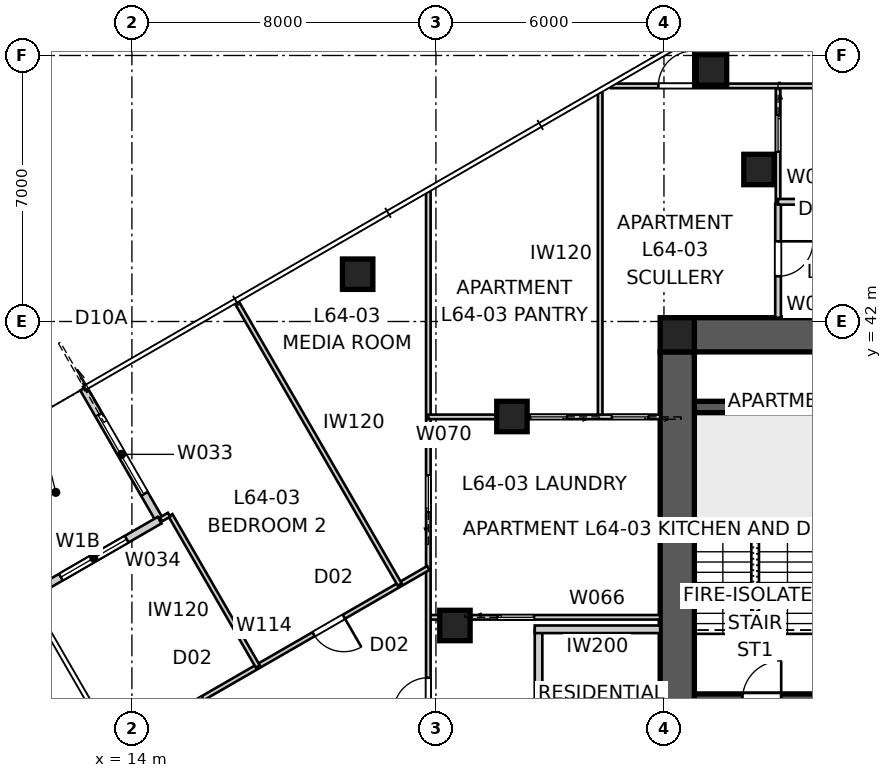
"""IFC4 building model, lengths in metres.
Left out: names, types, materials, properties, quantities, classifications, styles, units other than length and angle.
Written with IfcOpenShell. Run it as: python <this file> out.ifc"""

import sys

from ifc_helpers import new_model, si_unit, direction, frame, frame_2d, origin, origin_2d, place, context, subcontext, project, spatial, polyline, rectangle, outline, extrude, element, fill, save


model = new_model("IFC4")
c1 = context("Model", 3, precision=1e-05, world=origin(), true_north=direction((0.0, 1.0)))
c2 = subcontext(c1, "Body", "Model", "MODEL_VIEW")
j1 = project(units=[si_unit("LENGTHUNIT", "METRE"), si_unit("PLANEANGLEUNIT", "RADIAN")], contexts=[c1])
p1 = place(None, origin())
s1 = spatial("IfcSite", under=j1, at=p1, CompositionType="ELEMENT")
p2 = place(p1, origin())
s2 = spatial("IfcBuilding", under=s1, at=p2, CompositionType="ELEMENT")
p3 = place(p2, frame((0.0, 0.0, 232.0)))
s3 = spatial("IfcBuildingStorey", under=s2, at=p3, CompositionType="ELEMENT", Elevation=232.0)
p4 = place(p3, frame((28.8, 41.65, 0.0), z_axis=(0.0, 0.0, 1.0), x_axis=(1.0, 0.0, 0.0)))
e1 = element("IfcWall", 1, at=p4, inside=s3, PredefinedType="SHEAR", context=c2, shape_type="SweptSolid", body=[
    extrude(outline(polyline([(0.0, -0.45), (22.4, -0.45), (22.4, -0.025), (22.85, -0.025), (22.85, 0.025), (22.4, 0.025), (22.4, 0.45), (0.0, 0.45), (0.0, 0.025), (-0.45, 0.025), (-0.45, -0.025), (0.0, -0.025), (0.0, -0.45)])), origin(), (0.0, 0.0, 1.0), 3.4),
])
p5 = place(p3, frame((28.35, 41.2, 0.0), z_axis=(0.0, 0.0, 1.0), x_axis=(0.0, -1.0, 0.0)))
e2 = element("IfcWall", 2, at=p5, inside=s3, PredefinedType="SHEAR", context=c2, shape_type="SweptSolid", body=[
    extrude(outline(polyline([(0.0, -0.45), (22.4, -0.45), (22.4, -0.025), (22.85, -0.025), (22.85, 0.025), (22.4, 0.025), (22.4, 0.45), (0.0, 0.45), (0.0, 0.025), (-0.45, 0.025), (-0.45, -0.025), (0.0, -0.025), (0.0, -0.45)])), origin(), (0.0, 0.0, 1.0), 3.4),
])
p6 = place(p5, frame((11.14, 0.0, 0.0)))
e3 = element("IfcOpeningElement", 3, at=p6, cuts=e2, PredefinedType="OPENING", context=c2, shape_type="SweptSolid", body=[
    extrude(rectangle(XDim=1.02, YDim=2.4, at=frame_2d((0.51, 1.2))), frame((0.0, 0.46, 0.0), z_axis=(0.0, -1.0, 0.0), x_axis=(1.0, 0.0, 0.0)), (0.0, 0.0, 1.0), 0.92),
])
p7 = place(p3, frame((28.8, 32.05, 0.0), z_axis=(0.0, 0.0, 1.0), x_axis=(1.0, 0.0, 0.0)))
e4 = element("IfcWall", 4, at=p7, inside=s3, PredefinedType="SHEAR", context=c2, shape_type="SweptSolid", body=[
    extrude(rectangle(XDim=22.4, YDim=0.3, at=frame_2d((11.2, 0.0))), origin(), (0.0, 0.0, 1.0), 3.4),
])
p8 = place(p7, frame((19.04, 0.0, 0.0)))
e5 = element("IfcOpeningElement", 5, at=p8, cuts=e4, PredefinedType="OPENING", context=c2, shape_type="SweptSolid", body=[
    extrude(rectangle(XDim=0.92, YDim=2.1, at=frame_2d((0.46, 1.05))), frame((0.0, 0.16, 0.0), z_axis=(0.0, -1.0, 0.0), x_axis=(1.0, 0.0, 0.0)), (0.0, 0.0, 1.0), 0.32),
])
p9 = place(p7, frame((1.265, 0.0, 0.0)))
e6 = element("IfcOpeningElement", 6, at=p9, cuts=e4, PredefinedType="OPENING", context=c2, shape_type="SweptSolid", body=[
    extrude(rectangle(XDim=1.02, YDim=2.1, at=frame_2d((0.51, 1.05))), frame((0.0, 0.16, 0.0), z_axis=(0.0, -1.0, 0.0), x_axis=(1.0, 0.0, 0.0)), (0.0, 0.0, 1.0), 0.32),
])
p10 = place(p7, frame((4.015, 0.0, 0.0)))
e7 = element("IfcOpeningElement", 7, at=p10, cuts=e4, PredefinedType="OPENING", context=c2, shape_type="SweptSolid", body=[
    extrude(rectangle(XDim=0.92, YDim=2.1, at=frame_2d((0.46, 1.05))), frame((0.0, 0.16, 0.0), z_axis=(0.0, -1.0, 0.0), x_axis=(1.0, 0.0, 0.0)), (0.0, 0.0, 1.0), 0.32),
])
p11 = place(p7, frame((6.115, 0.0, 0.0)))
e8 = element("IfcOpeningElement", 8, at=p11, cuts=e4, PredefinedType="OPENING", context=c2, shape_type="SweptSolid", body=[
    extrude(rectangle(XDim=0.92, YDim=2.1, at=frame_2d((0.46, 1.05))), frame((0.0, 0.16, 0.0), z_axis=(0.0, -1.0, 0.0), x_axis=(1.0, 0.0, 0.0)), (0.0, 0.0, 1.0), 0.32),
])
p12 = place(p7, frame((9.79, 0.0, 0.0)))
e9 = element("IfcOpeningElement", 9, at=p12, cuts=e4, PredefinedType="OPENING", context=c2, shape_type="SweptSolid", body=[
    extrude(rectangle(XDim=0.92, YDim=2.1, at=frame_2d((0.46, 1.05))), frame((0.0, 0.16, 0.0), z_axis=(0.0, -1.0, 0.0), x_axis=(1.0, 0.0, 0.0)), (0.0, 0.0, 1.0), 0.32),
])
p13 = place(p7, frame((12.05, 0.0, 0.0)))
e10 = element("IfcOpeningElement", 10, at=p13, cuts=e4, PredefinedType="OPENING", context=c2, shape_type="SweptSolid", body=[
    extrude(rectangle(XDim=1.1, YDim=2.1, at=frame_2d((0.55, 1.05))), frame((0.0, 0.16, 0.0), z_axis=(0.0, -1.0, 0.0), x_axis=(1.0, 0.0, 0.0)), (0.0, 0.0, 1.0), 0.32),
])
p14 = place(p7, frame((14.85, 0.0, 0.0)))
e11 = element("IfcOpeningElement", 11, at=p14, cuts=e4, PredefinedType="OPENING", context=c2, shape_type="SweptSolid", body=[
    extrude(rectangle(XDim=1.1, YDim=2.1, at=frame_2d((0.55, 1.05))), frame((0.0, 0.16, 0.0), z_axis=(0.0, -1.0, 0.0), x_axis=(1.0, 0.0, 0.0)), (0.0, 0.0, 1.0), 0.32),
])
p15 = place(p3, frame((28.8, 39.75, 0.0), z_axis=(0.0, 0.0, 1.0), x_axis=(1.0, 0.0, 0.0)))
e12 = element("IfcWall", 12, at=p15, inside=s3, PredefinedType="SHEAR", context=c2, shape_type="SweptSolid", body=[
    extrude(rectangle(XDim=3.5, YDim=0.3, at=frame_2d((1.75, 0.0))), origin(), (0.0, 0.0, 1.0), 3.4),
])
p16 = place(p3, frame((28.35, 41.65, 0.0), z_axis=(0.0, 0.0, 1.0), x_axis=(1.0, 0.0, 0.0)))
e13 = element("IfcColumn", 13, at=p16, inside=s3, PredefinedType="COLUMN", context=c2, shape_type="SweptSolid", body=[
    extrude(rectangle(XDim=0.9, YDim=0.9, at=origin_2d()), origin(), (0.0, 0.0, 1.0), 3.4),
])
for number, where, z_axis, x_axis in (
    (14, (29.25, 48.62, 0.0), (0.0, 0.0, 1.0), (1.0, 0.0, 0.0)),
    (15, (19.94, 43.245, 0.0), (0.0, 0.0, 1.0), (1.0, 0.0, 0.0)),
):
    element("IfcColumn", number, at=place(p3, frame(where, z_axis=z_axis, x_axis=x_axis)), inside=s3, PredefinedType="COLUMN", context=c2, shape_type="SweptSolid", body=[
        extrude(rectangle(XDim=0.8, YDim=0.8, at=origin_2d()), origin(), (0.0, 0.0, 1.0), 3.2),
    ])
for number, where, z_axis, x_axis in (
    (16, (30.5, 46.0, 0.0), (0.0, 0.0, 1.0), (1.0, 0.0, 0.0)),
    (17, (24.0, 39.5, 0.0), (0.0, 0.0, 1.0), (1.0, 0.0, 0.0)),
    (18, (22.5, 34.0, 0.0), (0.0, 0.0, 1.0), (1.0, 0.0, 0.0)),
):
    element("IfcColumn", number, at=place(p3, frame(where, z_axis=z_axis, x_axis=x_axis)), inside=s3, PredefinedType="COLUMN", context=c2, shape_type="SweptSolid", body=[
        extrude(rectangle(XDim=0.8, YDim=0.8, at=origin_2d()), origin(), (0.0, 0.0, 1.0), 3.4),
    ])
p17 = place(p3, frame((12.729, 40.236, 0.0), z_axis=(0.0, 0.0, 1.0), x_axis=(0.49999894854, -0.866026010844, 0.0)))
e19 = element("IfcWall", 19, at=p17, inside=s3, PredefinedType="SOLIDWALL", context=c2, shape_type="SweptSolid", body=[
    extrude(rectangle(XDim=4.0, YDim=0.2, at=frame_2d((2.0, 0.0))), origin(), (0.0, 0.0, 1.0), 3.2),
])
p18 = place(p17, frame((0.8, 0.0, 0.0)))
e20 = element("IfcOpeningElement", 20, at=p18, cuts=e19, PredefinedType="OPENING", context=c2, shape_type="SweptSolid", body=[
    extrude(rectangle(XDim=2.4, YDim=2.1, at=frame_2d((1.2, 1.05))), frame((0.0, 0.11, 0.0), z_axis=(0.0, -1.0, 0.0), x_axis=(1.0, 0.0, 0.0)), (0.0, 0.0, 1.0), 0.22),
])
p19 = place(p3, frame((14.729, 36.771, 0.0), z_axis=(0.0, 0.0, 1.0), x_axis=(-0.866026010844, -0.49999894854, 0.0)))
e21 = element("IfcWall", 21, at=p19, inside=s3, PredefinedType="SOLIDWALL", context=c2, shape_type="SweptSolid", body=[
    extrude(rectangle(XDim=4.0, YDim=0.2, at=frame_2d((2.0, 0.0))), origin(), (0.0, 0.0, 1.0), 3.2),
])
p20 = place(p19, frame((1.0, 0.0, 0.4)))
e22 = element("IfcOpeningElement", 22, at=p20, cuts=e21, PredefinedType="OPENING", context=c2, shape_type="SweptSolid", body=[
    extrude(rectangle(XDim=2.0, YDim=1.8, at=frame_2d((1.0, 0.9))), frame((0.0, 0.11, 0.0), z_axis=(0.0, -1.0, 0.0), x_axis=(1.0, 0.0, 0.0)), (0.0, 0.0, 1.0), 0.22),
])
p21 = place(p3, frame((24.7, 26.1, 0.0), z_axis=(0.0, 0.0, 1.0), x_axis=(0.0, 1.0, 0.0)))
e23 = element("IfcWall", 23, at=p21, inside=s3, PredefinedType="PARTITIONING", context=c2, shape_type="SweptSolid", body=[
    extrude(rectangle(XDim=7.8, YDim=0.2, at=frame_2d((3.9, 0.0))), origin(), (0.0, 0.0, 1.0), 3.2),
])
p22 = place(p21, frame((3.39, 0.0, 0.0)))
e24 = element("IfcOpeningElement", 24, at=p22, cuts=e23, PredefinedType="OPENING", context=c2, shape_type="SweptSolid", body=[
    extrude(rectangle(XDim=1.02, YDim=2.34, at=frame_2d((0.51, 1.17))), frame((0.0, 0.11, 0.0), z_axis=(0.0, -1.0, 0.0), x_axis=(1.0, 0.0, 0.0)), (0.0, 0.0, 1.0), 0.22),
])
p23 = place(p3, frame((27.9, 33.9, 0.0), z_axis=(0.0, 0.0, 1.0), x_axis=(-1.0, 0.0, 0.0)))
e25 = element("IfcWall", 25, at=p23, inside=s3, PredefinedType="PARTITIONING", context=c2, shape_type="SweptSolid", body=[
    extrude(rectangle(XDim=3.3, YDim=0.2, at=frame_2d((1.65, 0.0))), origin(), (0.0, 0.0, 1.0), 3.2),
])
p24 = place(p3, frame((21.8, 34.216, 0.0), z_axis=(0.0, 0.0, 1.0), x_axis=(1.0, 0.0, 0.0)))
e26 = element("IfcWall", 26, at=p24, inside=s3, PredefinedType="PARTITIONING", context=c2, shape_type="SweptSolid", body=[
    extrude(rectangle(XDim=6.1, YDim=0.12, at=frame_2d((3.05, 0.0))), origin(), (0.0, 0.0, 1.0), 3.2),
])
p25 = place(p24, frame((1.82, 0.0, 0.0)))
e27 = element("IfcOpeningElement", 27, at=p25, cuts=e26, PredefinedType="OPENING", context=c2, shape_type="SweptSolid", body=[
    extrude(rectangle(XDim=0.96, YDim=2.1, at=frame_2d((0.48, 1.05))), frame((0.0, 0.07, 0.0), z_axis=(0.0, -1.0, 0.0), x_axis=(1.0, 0.0, 0.0)), (0.0, 0.0, 1.0), 0.14),
])
p26 = place(p3, frame((21.8, 16.603, 0.0), z_axis=(0.0, 0.0, 1.0), x_axis=(0.0, 1.0, 0.0)))
e28 = element("IfcWall", 28, at=p26, inside=s3, PredefinedType="PARTITIONING", context=c2, shape_type="SweptSolid", body=[
    extrude(rectangle(XDim=28.823, YDim=0.12, at=frame_2d((14.412, 0.0))), origin(), (0.0, 0.0, 1.0), 3.2),
])
p27 = place(p26, frame((11.052, 0.0, 0.0)))
e29 = element("IfcOpeningElement", 29, at=p27, cuts=e28, PredefinedType="OPENING", context=c2, shape_type="SweptSolid", body=[
    extrude(rectangle(XDim=0.92, YDim=2.34, at=frame_2d((0.46, 1.17))), frame((0.0, 0.07, 0.0), z_axis=(0.0, -1.0, 0.0), x_axis=(1.0, 0.0, 0.0)), (0.0, 0.0, 1.0), 0.14),
])
p28 = place(p26, frame((15.102, 0.0, 0.0)))
e30 = element("IfcOpeningElement", 30, at=p28, cuts=e28, PredefinedType="OPENING", context=c2, shape_type="SweptSolid", body=[
    extrude(rectangle(XDim=0.92, YDim=2.34, at=frame_2d((0.46, 1.17))), frame((0.0, 0.07, 0.0), z_axis=(0.0, -1.0, 0.0), x_axis=(1.0, 0.0, 0.0)), (0.0, 0.0, 1.0), 0.14),
])
p29 = place(p26, frame((20.389, 0.0, 0.0)))
e31 = element("IfcOpeningElement", 31, at=p29, cuts=e28, PredefinedType="OPENING", context=c2, shape_type="SweptSolid", body=[
    extrude(rectangle(XDim=0.96, YDim=2.1, at=frame_2d((0.48, 1.05))), frame((0.0, 0.07, 0.0), z_axis=(0.0, -1.0, 0.0), x_axis=(1.0, 0.0, 0.0)), (0.0, 0.0, 1.0), 0.14),
])
p30 = place(p26, frame((0.326, 0.0, 0.0)))
e32 = element("IfcOpeningElement", 32, at=p30, cuts=e28, PredefinedType="OPENING", context=c2, shape_type="SweptSolid", body=[
    extrude(rectangle(XDim=0.96, YDim=2.1, at=frame_2d((0.48, 1.05))), frame((0.0, 0.07, 0.0), z_axis=(0.0, -1.0, 0.0), x_axis=(1.0, 0.0, 0.0)), (0.0, 0.0, 1.0), 0.14),
])
p31 = place(p3, frame((26.322, 39.49, 0.0), z_axis=(0.0, 0.0, 1.0), x_axis=(0.0, 1.0, 0.0)))
e33 = element("IfcWall", 33, at=p31, inside=s3, PredefinedType="PARTITIONING", context=c2, shape_type="SweptSolid", body=[
    extrude(rectangle(XDim=8.548, YDim=0.12, at=frame_2d((4.274, 0.0))), origin(), (0.0, 0.0, 1.0), 3.2),
])
p32 = place(p3, frame((27.9, 39.49, 0.0), z_axis=(0.0, 0.0, 1.0), x_axis=(-1.0, 0.0, 0.0)))
e34 = element("IfcWall", 34, at=p32, inside=s3, PredefinedType="PARTITIONING", context=c2, shape_type="SweptSolid", body=[
    extrude(rectangle(XDim=6.1, YDim=0.12, at=frame_2d((3.05, 0.0))), origin(), (0.0, 0.0, 1.0), 3.2),
])
p33 = place(p32, frame((2.459, 0.0, 0.0)))
e35 = element("IfcOpeningElement", 35, at=p33, cuts=e34, PredefinedType="OPENING", context=c2, shape_type="SweptSolid", body=[
    extrude(rectangle(XDim=0.96, YDim=2.1, at=frame_2d((0.48, 1.05))), frame((0.0, 0.07, 0.0), z_axis=(0.0, -1.0, 0.0), x_axis=(1.0, 0.0, 0.0)), (0.0, 0.0, 1.0), 0.14),
])
p34 = place(p32, frame((0.309, 0.0, 0.0)))
e36 = element("IfcOpeningElement", 36, at=p34, cuts=e34, PredefinedType="OPENING", context=c2, shape_type="SweptSolid", body=[
    extrude(rectangle(XDim=0.96, YDim=2.1, at=frame_2d((0.48, 1.05))), frame((0.0, 0.07, 0.0), z_axis=(0.0, -1.0, 0.0), x_axis=(1.0, 0.0, 0.0)), (0.0, 0.0, 1.0), 0.14),
])
p35 = place(p3, frame((31.003, 48.2, 0.0), z_axis=(0.0, 0.0, 1.0), x_axis=(0.0, -1.0, 0.0)))
e37 = element("IfcWall", 37, at=p35, inside=s3, PredefinedType="PARTITIONING", context=c2, shape_type="SweptSolid", body=[
    extrude(rectangle(XDim=3.1, YDim=0.12, at=frame_2d((1.55, 0.0))), origin(), (0.0, 0.0, 1.0), 3.2),
])
p36 = place(p35, frame((0.77, 0.0, 0.0)))
e38 = element("IfcOpeningElement", 38, at=p36, cuts=e37, PredefinedType="OPENING", context=c2, shape_type="SweptSolid", body=[
    extrude(rectangle(XDim=0.96, YDim=2.1, at=frame_2d((0.48, 1.05))), frame((0.0, 0.07, 0.0), z_axis=(0.0, -1.0, 0.0), x_axis=(1.0, 0.0, 0.0)), (0.0, 0.0, 1.0), 0.14),
])
p37 = place(p3, frame((31.003, 45.1, 0.0), z_axis=(0.0, 0.0, 1.0), x_axis=(0.0, -1.0, 0.0)))
e39 = element("IfcWall", 39, at=p37, inside=s3, PredefinedType="SOLIDWALL", context=c2, shape_type="SweptSolid", body=[
    extrude(rectangle(XDim=3.0, YDim=0.15, at=frame_2d((1.5, 0.0))), origin(), (0.0, 0.0, 1.0), 3.2),
])
p38 = place(p37, frame((0.99, 0.0, 0.0)))
e40 = element("IfcOpeningElement", 40, at=p38, cuts=e39, PredefinedType="OPENING", context=c2, shape_type="SweptSolid", body=[
    extrude(rectangle(XDim=0.92, YDim=2.34, at=frame_2d((0.46, 1.17))), frame((0.0, 0.085, 0.0), z_axis=(0.0, -1.0, 0.0), x_axis=(1.0, 0.0, 0.0)), (0.0, 0.0, 1.0), 0.17),
])
p39 = place(p3, frame((26.603, 48.2, 0.0), z_axis=(0.0, 0.0, 1.0), x_axis=(1.0, 0.0, 0.0)))
e41 = element("IfcWall", 41, at=p39, inside=s3, PredefinedType="PARTITIONING", context=c2, shape_type="SweptSolid", body=[
    extrude(rectangle(XDim=17.17, YDim=0.12, at=frame_2d((8.585, 0.0))), origin(), (0.0, 0.0, 1.0), 3.2),
])
p40 = place(p39, frame((1.25, 0.0, 0.0)))
e42 = element("IfcOpeningElement", 42, at=p40, cuts=e41, PredefinedType="OPENING", context=c2, shape_type="SweptSolid", body=[
    extrude(rectangle(XDim=0.92, YDim=2.1, at=frame_2d((0.46, 1.05))), frame((0.0, 0.07, 0.0), z_axis=(0.0, -1.0, 0.0), x_axis=(1.0, 0.0, 0.0)), (0.0, 0.0, 1.0), 0.14),
])
p41 = place(p3, frame((41.753, 45.15, 0.0), z_axis=(0.0, 0.0, 1.0), x_axis=(-1.0, 0.0, 0.0)))
e43 = element("IfcWall", 43, at=p41, inside=s3, PredefinedType="SOLIDWALL", context=c2, shape_type="SweptSolid", body=[
    extrude(rectangle(XDim=10.751, YDim=0.15, at=frame_2d((5.375, 0.0))), origin(), (0.0, 0.0, 1.0), 3.2),
])
p42 = place(p3, frame((21.8, 35.514, 0.0), z_axis=(0.0, 0.0, 1.0), x_axis=(-0.86602907136, -0.49999364752, 0.0)))
e44 = element("IfcWall", 44, at=p42, inside=s3, PredefinedType="PARTITIONING", context=c2, shape_type="SweptSolid", body=[
    extrude(rectangle(XDim=9.455, YDim=0.12, at=frame_2d((4.728, 0.0))), origin(), (0.0, 0.0, 1.0), 3.2),
])
p43 = place(p42, frame((6.854, 0.0, 0.0)))
e45 = element("IfcOpeningElement", 45, at=p43, cuts=e44, PredefinedType="OPENING", context=c2, shape_type="SweptSolid", body=[
    extrude(rectangle(XDim=0.92, YDim=2.34, at=frame_2d((0.46, 1.17))), frame((0.0, 0.07, 0.0), z_axis=(0.0, -1.0, 0.0), x_axis=(1.0, 0.0, 0.0)), (0.0, 0.0, 1.0), 0.14),
])
p44 = place(p42, frame((2.566, 0.0, 0.0)))
e46 = element("IfcOpeningElement", 46, at=p44, cuts=e44, PredefinedType="OPENING", context=c2, shape_type="SweptSolid", body=[
    extrude(rectangle(XDim=0.92, YDim=2.34, at=frame_2d((0.46, 1.17))), frame((0.0, 0.07, 0.0), z_axis=(0.0, -1.0, 0.0), x_axis=(1.0, 0.0, 0.0)), (0.0, 0.0, 1.0), 0.14),
])
p45 = place(p3, frame((16.754, 42.513, 0.0), z_axis=(0.0, 0.0, 1.0), x_axis=(0.500017009237, -0.866015583274, 0.0)))
e47 = element("IfcWall", 47, at=p45, inside=s3, PredefinedType="PARTITIONING", context=c2, shape_type="SweptSolid", body=[
    extrude(rectangle(XDim=8.586, YDim=0.12, at=frame_2d((4.293, 0.0))), origin(), (0.0, 0.0, 1.0), 3.2),
])
p46 = place(p3, frame((17.312, 32.922, 0.0), z_axis=(0.0, 0.0, 1.0), x_axis=(-0.499984590049, 0.866034300541, 0.0)))
e48 = element("IfcWall", 48, at=p46, inside=s3, PredefinedType="PARTITIONING", context=c2, shape_type="SweptSolid", body=[
    extrude(rectangle(XDim=4.595, YDim=0.12, at=frame_2d((2.298, 0.0))), origin(), (0.0, 0.0, 1.0), 3.2),
])
p47 = place(p3, frame((14.976, 36.914, 0.0), z_axis=(0.0, 0.0, 1.0), x_axis=(-0.86640078905, -0.499349249257, 0.0)))
e49 = element("IfcWall", 49, at=p47, inside=s3, PredefinedType="PARTITIONING", context=c2, shape_type="SweptSolid", body=[
    extrude(rectangle(XDim=0.245, YDim=0.12, at=frame_2d((0.123, 0.0))), origin(), (0.0, 0.0, 1.0), 3.2),
])
p48 = place(p18, origin())
e50 = element("IfcDoor", 50, at=p48, inside=s3, OperationType="SLIDING_TO_LEFT", PredefinedType="DOOR", context=c2, shape_type="SweptSolid", body=[
    extrude(rectangle(XDim=2.4, YDim=2.1, at=frame_2d((1.2, 1.05))), frame((0.0, 0.025, 0.0), z_axis=(0.0, -1.0, 0.0), x_axis=(1.0, 0.0, 0.0)), (0.0, 0.0, 1.0), 0.05),
])
fill(e20, e50)
p49 = place(p20, origin())
e51 = element("IfcWindow", 51, at=p49, inside=s3, PartitioningType="SINGLE_PANEL", PredefinedType="WINDOW", context=c2, shape_type="SweptSolid", body=[
    extrude(rectangle(XDim=2.0, YDim=1.8, at=frame_2d((1.0, 0.9))), frame((0.0, 0.03, 0.0), z_axis=(0.0, -1.0, 0.0), x_axis=(1.0, 0.0, 0.0)), (0.0, 0.0, 1.0), 0.06),
])
fill(e22, e51)
p50 = place(p25, origin())
e52 = element("IfcDoor", 52, at=p50, inside=s3, OperationType="SLIDING_TO_LEFT", PredefinedType="DOOR", context=c2, shape_type="SweptSolid", body=[
    extrude(rectangle(XDim=0.96, YDim=2.1, at=frame_2d((0.48, 1.05))), frame((0.0, 0.025, 0.0), z_axis=(0.0, -1.0, 0.0), x_axis=(1.0, 0.0, 0.0)), (0.0, 0.0, 1.0), 0.05),
])
fill(e27, e52)
p51 = place(p28, origin())
e53 = element("IfcDoor", 53, at=p51, inside=s3, OperationType="SINGLE_SWING_LEFT", PredefinedType="DOOR", context=c2, shape_type="SweptSolid", body=[
    extrude(rectangle(XDim=0.92, YDim=2.34, at=frame_2d((0.46, 1.17))), frame((0.0, 0.025, 0.0), z_axis=(0.0, -1.0, 0.0), x_axis=(1.0, 0.0, 0.0)), (0.0, 0.0, 1.0), 0.05),
])
fill(e30, e53)
p52 = place(p33, origin())
e54 = element("IfcDoor", 54, at=p52, inside=s3, OperationType="SLIDING_TO_LEFT", PredefinedType="DOOR", context=c2, shape_type="SweptSolid", body=[
    extrude(rectangle(XDim=0.96, YDim=2.1, at=frame_2d((0.48, 1.05))), frame((0.0, 0.025, 0.0), z_axis=(0.0, -1.0, 0.0), x_axis=(1.0, 0.0, 0.0)), (0.0, 0.0, 1.0), 0.05),
])
fill(e35, e54)
p53 = place(p29, origin())
e55 = element("IfcDoor", 55, at=p53, inside=s3, OperationType="SLIDING_TO_LEFT", PredefinedType="DOOR", context=c2, shape_type="SweptSolid", body=[
    extrude(rectangle(XDim=0.96, YDim=2.1, at=frame_2d((0.48, 1.05))), frame((0.0, 0.025, 0.0), z_axis=(0.0, -1.0, 0.0), x_axis=(1.0, 0.0, 0.0)), (0.0, 0.0, 1.0), 0.05),
])
fill(e31, e55)
p54 = place(p34, origin())
e56 = element("IfcDoor", 56, at=p54, inside=s3, OperationType="SLIDING_TO_LEFT", PredefinedType="DOOR", context=c2, shape_type="SweptSolid", body=[
    extrude(rectangle(XDim=0.96, YDim=2.1, at=frame_2d((0.48, 1.05))), frame((0.0, 0.025, 0.0), z_axis=(0.0, -1.0, 0.0), x_axis=(1.0, 0.0, 0.0)), (0.0, 0.0, 1.0), 0.05),
])
fill(e36, e56)
p55 = place(p43, origin())
e57 = element("IfcDoor", 57, at=p55, inside=s3, OperationType="SINGLE_SWING_RIGHT", PredefinedType="DOOR", context=c2, shape_type="SweptSolid", body=[
    extrude(rectangle(XDim=0.92, YDim=2.34, at=frame_2d((0.46, 1.17))), frame((0.0, 0.025, 0.0), z_axis=(0.0, -1.0, 0.0), x_axis=(1.0, 0.0, 0.0)), (0.0, 0.0, 1.0), 0.05),
])
fill(e45, e57)
p56 = place(p44, origin())
e58 = element("IfcDoor", 58, at=p56, inside=s3, OperationType="SINGLE_SWING_LEFT", PredefinedType="DOOR", context=c2, shape_type="SweptSolid", body=[
    extrude(rectangle(XDim=0.92, YDim=2.34, at=frame_2d((0.46, 1.17))), frame((0.0, 0.025, 0.0), z_axis=(0.0, -1.0, 0.0), x_axis=(1.0, 0.0, 0.0)), (0.0, 0.0, 1.0), 0.05),
])
fill(e46, e58)
p57 = place(p40, origin())
e59 = element("IfcDoor", 59, at=p57, inside=s3, OperationType="SINGLE_SWING_RIGHT", PredefinedType="DOOR", context=c2, shape_type="SweptSolid", body=[
    extrude(rectangle(XDim=0.92, YDim=2.1, at=frame_2d((0.46, 1.05))), frame((0.0, 0.025, 0.0), z_axis=(0.0, -1.0, 0.0), x_axis=(1.0, 0.0, 0.0)), (0.0, 0.0, 1.0), 0.05),
])
fill(e42, e59)
p58 = place(p36, origin())
e60 = element("IfcDoor", 60, at=p58, inside=s3, OperationType="SLIDING_TO_LEFT", PredefinedType="DOOR", context=c2, shape_type="SweptSolid", body=[
    extrude(rectangle(XDim=0.96, YDim=2.1, at=frame_2d((0.48, 1.05))), frame((0.0, 0.025, 0.0), z_axis=(0.0, -1.0, 0.0), x_axis=(1.0, 0.0, 0.0)), (0.0, 0.0, 1.0), 0.05),
])
fill(e38, e60)
p59 = place(p38, origin())
e61 = element("IfcDoor", 61, at=p59, inside=s3, OperationType="SINGLE_SWING_LEFT", PredefinedType="DOOR", context=c2, shape_type="SweptSolid", body=[
    extrude(rectangle(XDim=0.92, YDim=2.34, at=frame_2d((0.46, 1.17))), frame((0.0, 0.025, 0.0), z_axis=(0.0, -1.0, 0.0), x_axis=(1.0, 0.0, 0.0)), (0.0, 0.0, 1.0), 0.05),
])
fill(e40, e61)
save(model, sys.argv[1])
